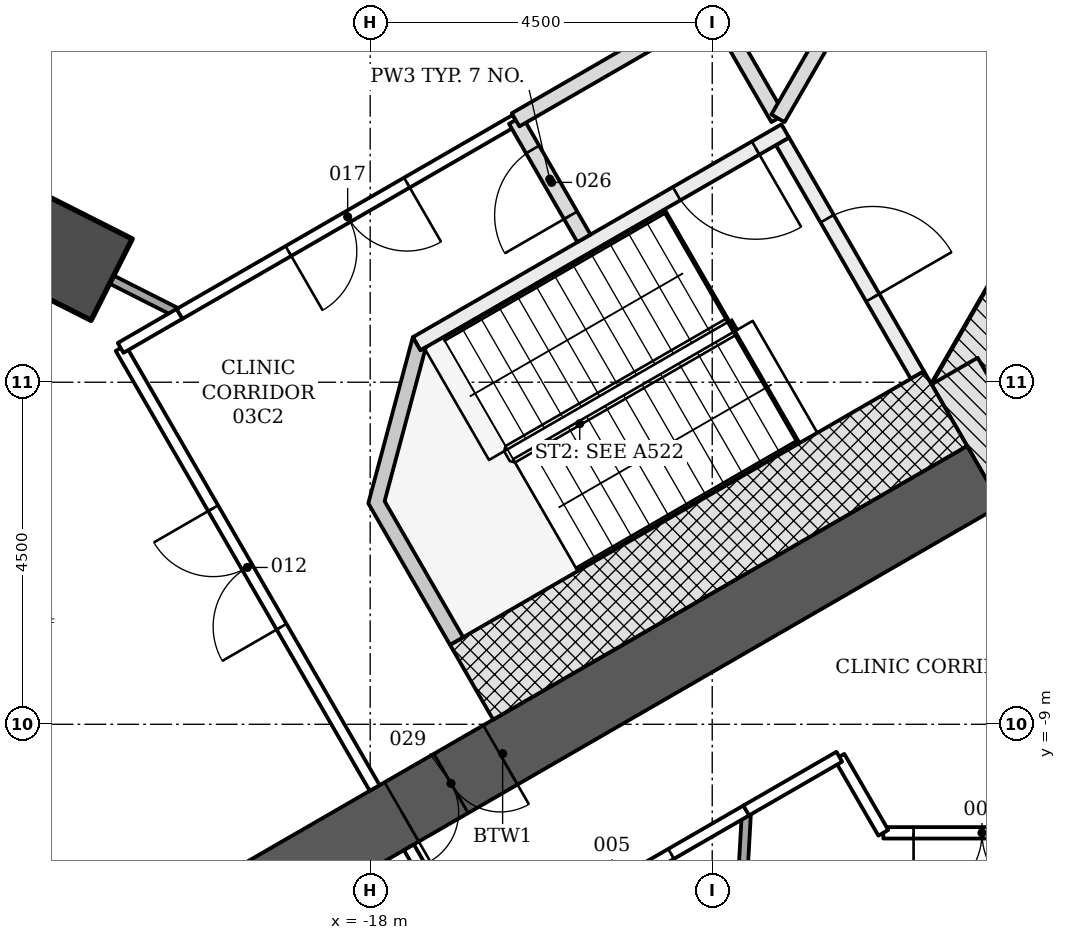
"""IFC4 building model, lengths in metres.
Left out: names, types, materials, properties, quantities, classifications, styles, units other than length and angle.
Written with IfcOpenShell. Run it as: python <this file> out.ifc"""

import sys

from ifc_helpers import new_model, si_unit, direction, frame, frame_2d, origin, origin_2d, place, context, subcontext, project, spatial, polyline, rectangle, outline, extrude, element, fill, save


model = new_model("IFC4")
c1 = context("Model", 3, precision=1e-05, world=origin(), true_north=direction((0.0, 1.0)))
c2 = subcontext(c1, "Body", "Model", "MODEL_VIEW")
j1 = project(units=[si_unit("LENGTHUNIT", "METRE"), si_unit("PLANEANGLEUNIT", "RADIAN")], contexts=[c1])
p1 = place(None, origin())
s1 = spatial("IfcSite", under=j1, at=p1, CompositionType="ELEMENT")
p2 = place(p1, origin())
s2 = spatial("IfcBuilding", under=s1, at=p2, CompositionType="ELEMENT")
p3 = place(p2, frame((0.0, 0.0, 15.0)))
s3 = spatial("IfcBuildingStorey", under=s2, at=p3, CompositionType="ELEMENT", Elevation=15.0)
p4 = place(p3, frame((-21.937, -2.88, -0.25), z_axis=(0.0, 0.0, 1.0), x_axis=(-0.89250065469, 0.451046096733, 0.0)))
e1 = element("IfcColumn", 1, at=p4, inside=s3, PredefinedType="COLUMN", context=c2, shape_type="SweptSolid", body=[
    extrude(rectangle(XDim=1.2, YDim=1.2, at=origin_2d()), origin(), (0.0, 0.0, 1.0), 4.5),
])
p5 = place(p3, frame((-1.083, 11.281, -0.25), z_axis=(0.0, 0.0, 1.0), x_axis=(-0.500001446645, -0.866024568562, 0.0)))
e2 = element("IfcWall", 2, at=p5, inside=s3, PredefinedType="SHEAR", context=c2, shape_type="SweptSolid", body=[
    extrude(rectangle(XDim=18.458, YDim=0.7, at=frame_2d((9.229, 0.0))), origin(), (0.0, 0.0, 1.0), 4.5),
])
p6 = place(p5, frame((8.979, 0.0, 0.25)))
e3 = element("IfcOpeningElement", 3, at=p6, cuts=e2, PredefinedType="OPENING", context=c2, shape_type="SweptSolid", body=[
    extrude(rectangle(XDim=1.2, YDim=2.1, at=frame_2d((0.6, 1.05))), frame((0.0, 0.36, 0.0), z_axis=(0.0, -1.0, 0.0), x_axis=(1.0, 0.0, 0.0)), (0.0, 0.0, 1.0), 0.72),
])
p7 = place(p5, frame((11.029, 0.0, 0.25)))
e4 = element("IfcOpeningElement", 4, at=p7, cuts=e2, PredefinedType="OPENING", context=c2, shape_type="SweptSolid", body=[
    extrude(rectangle(XDim=1.2, YDim=2.1, at=frame_2d((0.6, 1.05))), frame((0.0, 0.36, 0.0), z_axis=(0.0, -1.0, 0.0), x_axis=(1.0, 0.0, 0.0)), (0.0, 0.0, 1.0), 0.72),
])
p8 = place(p3, frame((-10.311, -4.353, -0.25), z_axis=(0.0, 0.0, 1.0), x_axis=(0.500042739161, -0.866000726912, 0.0)))
e5 = element("IfcWall", 5, at=p8, inside=s3, PredefinedType="SHEAR", context=c2, shape_type="SweptSolid", body=[
    extrude(rectangle(XDim=2.771, YDim=0.7, at=frame_2d((1.386, 0.0))), origin(), (0.0, 0.0, 1.0), 4.5),
])
p9 = place(p3, frame((-9.922, -5.728, -0.25), z_axis=(0.0, 0.0, 1.0), x_axis=(-0.866028046028, -0.499995423472, 0.0)))
e6 = element("IfcWall", 6, at=p9, inside=s3, PredefinedType="SHEAR", context=c2, shape_type="SweptSolid", body=[
    extrude(rectangle(XDim=14.633, YDim=0.9, at=frame_2d((7.316, 0.0))), origin(), (0.0, 0.0, 1.0), 4.5),
])
p10 = place(p9, frame((7.35, 0.0, 0.25)))
e7 = element("IfcOpeningElement", 7, at=p10, cuts=e6, PredefinedType="OPENING", context=c2, shape_type="SweptSolid", body=[
    extrude(rectangle(XDim=1.5, YDim=2.1, at=frame_2d((0.75, 1.05))), frame((0.0, 0.46, 0.0), z_axis=(0.0, -1.0, 0.0), x_axis=(1.0, 0.0, 0.0)), (0.0, 0.0, 1.0), 0.92),
])
p11 = place(p3, frame((-12.576, -1.331, -0.25), z_axis=(0.0, 0.0, 1.0), x_axis=(0.499970499736, -0.8660424351, 0.0)))
e8 = element("IfcWall", 8, at=p11, inside=s3, PredefinedType="SHEAR", context=c2, shape_type="SweptSolid", body=[
    extrude(rectangle(XDim=3.55, YDim=0.2, at=frame_2d((1.775, 0.0))), origin(), (0.0, 0.0, 1.0), 4.5),
])
p12 = place(p11, frame((1.175, 0.0, 0.25)))
e9 = element("IfcOpeningElement", 9, at=p12, cuts=e8, PredefinedType="OPENING", context=c2, shape_type="SweptSolid", body=[
    extrude(rectangle(XDim=1.2, YDim=2.1, at=frame_2d((0.6, 1.05))), frame((0.0, 0.11, 0.0), z_axis=(0.0, -1.0, 0.0), x_axis=(1.0, 0.0, 0.0)), (0.0, 0.0, 1.0), 0.22),
])
p13 = place(p3, frame((-12.539, -1.194, -0.25), z_axis=(0.0, 0.0, 1.0), x_axis=(-0.866045472092, -0.499965239061, 0.0)))
e10 = element("IfcWall", 10, at=p13, inside=s3, PredefinedType="SHEAR", context=c2, shape_type="SweptSolid", body=[
    extrude(rectangle(XDim=5.6, YDim=0.2, at=frame_2d((2.8, 0.0))), origin(), (0.0, 0.0, 1.0), 4.5),
])
p14 = place(p13, frame((0.45, 0.0, 0.25)))
e11 = element("IfcOpeningElement", 11, at=p14, cuts=e10, PredefinedType="OPENING", context=c2, shape_type="SweptSolid", body=[
    extrude(rectangle(XDim=1.2, YDim=2.1, at=frame_2d((0.6, 1.05))), frame((0.0, 0.11, 0.0), z_axis=(0.0, -1.0, 0.0), x_axis=(1.0, 0.0, 0.0)), (0.0, 0.0, 1.0), 0.22),
])
p15 = place(p3, frame((-10.43, -4.847, -0.25), z_axis=(0.0, 0.0, 1.0), x_axis=(-0.866018442252, -0.500012057535, 0.0)))
e12 = element("IfcWall", 12, at=p15, inside=s3, PredefinedType="SHEAR", context=c2, shape_type="SweptSolid", body=[
    extrude(rectangle(XDim=7.2, YDim=1.136, at=frame_2d((3.6, 0.0))), origin(), (0.0, 0.0, 1.0), 4.5),
])
p16 = place(p3, frame((0.0, 0.0, -0.25)))
e13 = element("IfcWall", 13, at=p16, inside=s3, PredefinedType="SHEAR", context=c2, shape_type="SweptSolid", body=[
    extrude(outline(polyline([(-17.439, -3.907), (-18.025, -6.093), (-16.95, -7.955), (-16.777, -7.855), (-17.81, -6.065), (-17.267, -4.039), (-17.339, -4.081), (-17.339, -4.081), (-17.339, -4.081), (-17.339, -4.081), (-17.339, -4.081), (-17.339, -4.081), (-17.339, -4.081), (-17.339, -4.081), (-17.339, -4.081), (-17.339, -4.081), (-17.339, -4.081), (-17.339, -4.081), (-17.339, -4.081), (-17.339, -4.081), (-17.339, -4.081), (-17.339, -4.081), (-17.339, -4.081), (-17.439, -3.907)])), origin(), (0.0, 0.0, 1.0), 4.5),
])
p17 = place(p3, frame((-13.429, -16.96, 0.0), z_axis=(0.0, 0.0, 1.0), x_axis=(0.055551088657, 0.998455846069, 0.0)))
e14 = element("IfcWall", 14, at=p17, inside=s3, PredefinedType="PARTITIONING", context=c2, shape_type="SweptSolid", body=[
    extrude(rectangle(XDim=6.838, YDim=0.12, at=frame_2d((3.419, 0.0))), origin(), (0.0, 0.0, 1.0), 3.638),
])
p18 = place(p3, frame((-13.045, -10.13, 0.0), z_axis=(0.0, 0.0, 1.0), x_axis=(-0.866035577775, -0.499982377718, 0.0)))
e15 = element("IfcWall", 15, at=p18, inside=s3, PredefinedType="PARTITIONING", context=c2, shape_type="SweptSolid", body=[
    extrude(rectangle(XDim=4.093, YDim=0.15, at=frame_2d((2.046, 0.0))), origin(), (0.0, 0.0, 1.0), 3.638),
])
p19 = place(p18, frame((1.15, 0.0, 0.0)))
e16 = element("IfcOpeningElement", 16, at=p19, cuts=e15, PredefinedType="OPENING", context=c2, shape_type="SweptSolid", body=[
    extrude(rectangle(XDim=1.8, YDim=2.1, at=frame_2d((0.9, 1.05))), frame((0.0, 0.085, 0.0), z_axis=(0.0, -1.0, 0.0), x_axis=(1.0, 0.0, 0.0)), (0.0, 0.0, 1.0), 0.17),
])
p20 = place(p3, frame((-16.591, -12.176, 0.0), z_axis=(0.0, 0.0, 1.0), x_axis=(-0.499965372359, 0.866045395139, 0.0)))
e17 = element("IfcWall", 17, at=p20, inside=s3, PredefinedType="PARTITIONING", context=c2, shape_type="SweptSolid", body=[
    extrude(rectangle(XDim=1.798, YDim=0.15, at=frame_2d((0.899, 0.0))), origin(), (0.0, 0.0, 1.0), 3.638),
])
p21 = place(p3, frame((-8.701, -10.428, 0.0), z_axis=(0.0, 0.0, 1.0), x_axis=(-1.0, 0.0, 0.0)))
e18 = element("IfcWall", 18, at=p21, inside=s3, PredefinedType="PARTITIONING", context=c2, shape_type="SweptSolid", body=[
    extrude(rectangle(XDim=2.548, YDim=0.15, at=frame_2d((1.274, 0.0))), origin(), (0.0, 0.0, 1.0), 3.638),
])
p22 = place(p21, frame((0.35, 0.0, 0.0)))
e19 = element("IfcOpeningElement", 19, at=p22, cuts=e18, PredefinedType="OPENING", context=c2, shape_type="SweptSolid", body=[
    extrude(rectangle(XDim=1.8, YDim=2.1, at=frame_2d((0.9, 1.05))), frame((0.0, 0.085, 0.0), z_axis=(0.0, -1.0, 0.0), x_axis=(1.0, 0.0, 0.0)), (0.0, 0.0, 1.0), 0.17),
])
p23 = place(p3, frame((-11.249, -10.428, 0.0), z_axis=(0.0, 0.0, 1.0), x_axis=(-0.499978438088, 0.866037852202, 0.0)))
e20 = element("IfcWall", 20, at=p23, inside=s3, PredefinedType="PARTITIONING", context=c2, shape_type="SweptSolid", body=[
    extrude(rectangle(XDim=1.156, YDim=0.15, at=frame_2d((0.578, 0.0))), origin(), (0.0, 0.0, 1.0), 4.25),
])
p24 = place(p3, frame((-11.828, -9.427, 0.0), z_axis=(0.0, 0.0, 1.0), x_axis=(-0.866110865696, -0.499851946404, 0.0)))
e21 = element("IfcWall", 21, at=p24, inside=s3, PredefinedType="PARTITIONING", context=c2, shape_type="SweptSolid", body=[
    extrude(rectangle(XDim=1.415, YDim=0.15, at=frame_2d((0.707, 0.0))), origin(), (0.0, 0.0, 1.0), 3.638),
])
p25 = place(p3, frame((-17.941, -9.838, 0.0), z_axis=(0.0, 0.0, 1.0), x_axis=(-0.500048140185, 0.865997608252, 0.0)))
e22 = element("IfcWall", 22, at=p25, inside=s3, PredefinedType="PARTITIONING", context=c2, shape_type="SweptSolid", body=[
    extrude(rectangle(XDim=6.683, YDim=0.15, at=frame_2d((3.342, 0.0))), origin(), (0.0, 0.0, 1.0), 3.638),
])
p26 = place(p25, frame((2.45, 0.0, 0.0)))
e23 = element("IfcOpeningElement", 23, at=p26, cuts=e22, PredefinedType="OPENING", context=c2, shape_type="SweptSolid", body=[
    extrude(rectangle(XDim=1.8, YDim=2.1, at=frame_2d((0.9, 1.05))), frame((0.0, 0.085, 0.0), z_axis=(0.0, -1.0, 0.0), x_axis=(1.0, 0.0, 0.0)), (0.0, 0.0, 1.0), 0.17),
])
p27 = place(p3, frame((-21.283, -4.048, 0.0), z_axis=(0.0, 0.0, 1.0), x_axis=(0.865804825377, 0.500381858538, 0.0)))
e24 = element("IfcWall", 24, at=p27, inside=s3, PredefinedType="PARTITIONING", context=c2, shape_type="SweptSolid", body=[
    extrude(rectangle(XDim=0.897, YDim=0.15, at=frame_2d((0.449, 0.0))), origin(), (0.0, 0.0, 1.0), 3.638),
])
p28 = place(p3, frame((-20.509, -3.601, 0.0), z_axis=(0.0, 0.0, 1.0), x_axis=(-0.892316605155, 0.451410097544, 0.0)))
e25 = element("IfcWall", 25, at=p28, inside=s3, PredefinedType="PARTITIONING", context=c2, shape_type="SweptSolid", body=[
    extrude(rectangle(XDim=1.0, YDim=0.12, at=frame_2d((0.5, 0.0))), origin(), (0.0, 0.0, 1.0), 3.638),
])
p29 = place(p3, frame((-16.088, -1.049, 0.0), z_axis=(0.0, 0.0, 1.0), x_axis=(-0.866023883975, -0.500002632377, 0.0)))
e26 = element("IfcWall", 26, at=p29, inside=s3, PredefinedType="PARTITIONING", context=c2, shape_type="SweptSolid", body=[
    extrude(rectangle(XDim=5.104, YDim=0.15, at=frame_2d((2.552, 0.0))), origin(), (0.0, 0.0, 1.0), 3.638),
])
p30 = place(p29, frame((1.65, 0.0, 0.0)))
e27 = element("IfcOpeningElement", 27, at=p30, cuts=e26, PredefinedType="OPENING", context=c2, shape_type="SweptSolid", body=[
    extrude(rectangle(XDim=1.8, YDim=2.1, at=frame_2d((0.9, 1.05))), frame((0.0, 0.085, 0.0), z_axis=(0.0, -1.0, 0.0), x_axis=(1.0, 0.0, 0.0)), (0.0, 0.0, 1.0), 0.17),
])
p31 = place(p3, frame((-15.188, -2.607, 0.0), z_axis=(0.0, 0.0, 1.0), x_axis=(-0.500024172624, 0.866011447264, 0.0)))
e28 = element("IfcWall", 28, at=p31, inside=s3, PredefinedType="PARTITIONING", context=c2, shape_type="SweptSolid", body=[
    extrude(rectangle(XDim=1.798, YDim=0.2, at=frame_2d((0.899, 0.0))), origin(), (0.0, 0.0, 1.0), 3.638),
])
p32 = place(p31, frame((0.35, 0.0, 0.0)))
e29 = element("IfcOpeningElement", 29, at=p32, cuts=e28, PredefinedType="OPENING", context=c2, shape_type="SweptSolid", body=[
    extrude(rectangle(XDim=1.0, YDim=2.1, at=frame_2d((0.5, 1.05))), frame((0.0, 0.11, 0.0), z_axis=(0.0, -1.0, 0.0), x_axis=(1.0, 0.0, 0.0)), (0.0, 0.0, 1.0), 0.22),
])
p33 = place(p3, frame((-16.087, -1.048, 0.0), z_axis=(0.0, 0.0, 1.0), x_axis=(0.865988915629, 0.500063194015, 0.0)))
e30 = element("IfcWall", 30, at=p33, inside=s3, PredefinedType="PARTITIONING", context=c2, shape_type="SweptSolid", body=[
    extrude(rectangle(XDim=2.998, YDim=0.2, at=frame_2d((1.499, 0.0))), origin(), (0.0, 0.0, 1.0), 3.638),
])
p34 = place(p3, frame((-13.489, 0.451, 0.0), z_axis=(0.0, 0.0, 1.0), x_axis=(0.500044178772, -0.865999895656, 0.0)))
e31 = element("IfcWall", 31, at=p34, inside=s3, PredefinedType="PARTITIONING", context=c2, shape_type="SweptSolid", body=[
    extrude(rectangle(XDim=1.708, YDim=0.2, at=frame_2d((0.854, 0.0))), origin(), (0.0, 0.0, 1.0), 4.25),
])
p35 = place(p3, frame((-12.635, -1.028, 0.0), z_axis=(0.0, 0.0, 1.0), x_axis=(0.499801250411, 0.866140121509, 0.0)))
e32 = element("IfcWall", 32, at=p35, inside=s3, PredefinedType="PARTITIONING", context=c2, shape_type="SweptSolid", body=[
    extrude(rectangle(XDim=2.861, YDim=0.2, at=frame_2d((1.431, 0.0))), origin(), (0.0, 0.0, 1.0), 3.638),
])
p36 = place(p12, origin())
e33 = element("IfcDoor", 33, at=p36, inside=s3, OperationType="SINGLE_SWING_RIGHT", PredefinedType="DOOR", context=c2, shape_type="SweptSolid", body=[
    extrude(rectangle(XDim=1.2, YDim=2.1, at=frame_2d((0.6, 1.05))), frame((0.0, 0.025, 0.0), z_axis=(0.0, -1.0, 0.0), x_axis=(1.0, 0.0, 0.0)), (0.0, 0.0, 1.0), 0.05),
])
fill(e9, e33)
p37 = place(p14, origin())
e34 = element("IfcDoor", 34, at=p37, inside=s3, OperationType="SINGLE_SWING_LEFT", PredefinedType="DOOR", context=c2, shape_type="SweptSolid", body=[
    extrude(rectangle(XDim=1.2, YDim=2.1, at=frame_2d((0.6, 1.05))), frame((0.0, 0.025, 0.0), z_axis=(0.0, -1.0, 0.0), x_axis=(1.0, 0.0, 0.0)), (0.0, 0.0, 1.0), 0.05),
])
fill(e11, e34)
p38 = place(p19, origin())
e35 = element("IfcDoor", 35, at=p38, inside=s3, OperationType="DOUBLE_DOOR_SINGLE_SWING", PredefinedType="DOOR", context=c2, shape_type="SweptSolid", body=[
    extrude(rectangle(XDim=1.8, YDim=2.1, at=frame_2d((0.9, 1.05))), frame((0.0, 0.025, 0.0), z_axis=(0.0, -1.0, 0.0), x_axis=(1.0, 0.0, 0.0)), (0.0, 0.0, 1.0), 0.05),
])
fill(e16, e35)
p39 = place(p22, origin())
e36 = element("IfcDoor", 36, at=p39, inside=s3, OperationType="DOUBLE_DOOR_SINGLE_SWING", PredefinedType="DOOR", context=c2, shape_type="SweptSolid", body=[
    extrude(rectangle(XDim=1.8, YDim=2.1, at=frame_2d((0.9, 1.05))), frame((0.0, 0.025, 0.0), z_axis=(0.0, -1.0, 0.0), x_axis=(1.0, 0.0, 0.0)), (0.0, 0.0, 1.0), 0.05),
])
fill(e19, e36)
p40 = place(p26, origin())
e37 = element("IfcDoor", 37, at=p40, inside=s3, OperationType="DOUBLE_DOOR_SINGLE_SWING", PredefinedType="DOOR", context=c2, shape_type="SweptSolid", body=[
    extrude(rectangle(XDim=1.8, YDim=2.1, at=frame_2d((0.9, 1.05))), frame((0.0, 0.025, 0.0), z_axis=(0.0, -1.0, 0.0), x_axis=(1.0, 0.0, 0.0)), (0.0, 0.0, 1.0), 0.05),
])
fill(e23, e37)
p41 = place(p30, origin())
e38 = element("IfcDoor", 38, at=p41, inside=s3, OperationType="DOUBLE_DOOR_SINGLE_SWING", PredefinedType="DOOR", context=c2, shape_type="SweptSolid", body=[
    extrude(rectangle(XDim=1.8, YDim=2.1, at=frame_2d((0.9, 1.05))), frame((0.0, 0.025, 0.0), z_axis=(0.0, -1.0, 0.0), x_axis=(1.0, 0.0, 0.0)), (0.0, 0.0, 1.0), 0.05),
])
fill(e27, e38)
p42 = place(p32, origin())
e39 = element("IfcDoor", 39, at=p42, inside=s3, OperationType="SINGLE_SWING_LEFT", PredefinedType="DOOR", context=c2, shape_type="SweptSolid", body=[
    extrude(rectangle(XDim=1.0, YDim=2.1, at=frame_2d((0.5, 1.05))), frame((0.0, 0.025, 0.0), z_axis=(0.0, -1.0, 0.0), x_axis=(1.0, 0.0, 0.0)), (0.0, 0.0, 1.0), 0.05),
])
fill(e29, e39)
p43 = place(p10, origin())
e40 = element("IfcDoor", 40, at=p43, inside=s3, OperationType="DOUBLE_DOOR_SINGLE_SWING", PredefinedType="DOOR", context=c2, shape_type="SweptSolid", body=[
    extrude(rectangle(XDim=1.5, YDim=2.1, at=frame_2d((0.75, 1.05))), frame((0.0, 0.025, 0.0), z_axis=(0.0, -1.0, 0.0), x_axis=(1.0, 0.0, 0.0)), (0.0, 0.0, 1.0), 0.05),
])
fill(e7, e40)
save(model, sys.argv[1])
